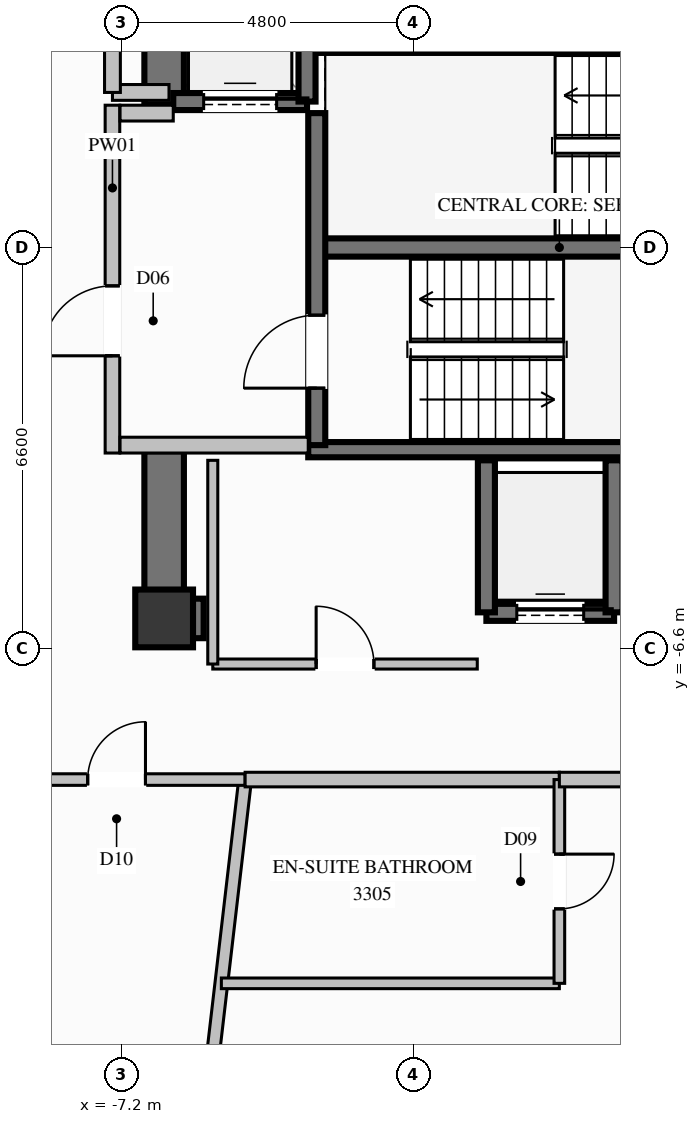
"""IFC4 building model, lengths in metres.
Left out: names, types, materials, properties, quantities, classifications, styles, units other than length and angle.
Written with IfcOpenShell. Run it as: python <this file> out.ifc"""

import sys

from ifc_helpers import new_model, si_unit, direction, frame, frame_2d, origin, origin_2d, place, context, subcontext, project, spatial, rectangle, extrude, element, fill, save


model = new_model("IFC4")
c1 = context("Model", 3, precision=1e-05, world=origin(), true_north=direction((0.0, 1.0)))
c2 = subcontext(c1, "Body", "Model", "MODEL_VIEW")
j1 = project(units=[si_unit("LENGTHUNIT", "METRE"), si_unit("PLANEANGLEUNIT", "RADIAN")], contexts=[c1])
p1 = place(None, origin())
s1 = spatial("IfcSite", under=j1, at=p1, CompositionType="ELEMENT")
p2 = place(p1, origin())
s2 = spatial("IfcBuilding", under=s1, at=p2, CompositionType="ELEMENT")
p3 = place(p2, frame((0.0, 0.0, 124.2)))
s3 = spatial("IfcBuildingStorey", under=s2, at=p3, CompositionType="ELEMENT", Elevation=124.2)
p4 = place(p3, frame((-6.5, -6.1, 0.0), z_axis=(0.0, 0.0, 1.0), x_axis=(1.0, 0.0, 0.0)))
e1 = element("IfcColumn", 1, at=p4, inside=s3, PredefinedType="COLUMN", context=c2, shape_type="SweptSolid", body=[
    extrude(rectangle(XDim=0.95, YDim=0.95, at=origin_2d()), origin(), (0.0, 0.0, 1.0), 3.6),
])
p5 = place(p3, frame((-3.99, 0.0, 0.0), z_axis=(0.0, 0.0, 1.0), x_axis=(1.0, 0.0, 0.0)))
e2 = element("IfcWall", 2, at=p5, inside=s3, PredefinedType="SHEAR", context=c2, shape_type="SweptSolid", body=[
    extrude(rectangle(XDim=7.98, YDim=0.3, at=frame_2d((3.99, 0.0))), origin(), (0.0, 0.0, 1.0), 3.6),
])
for number, where, z_axis, x_axis in (
    (3, (-4.13, -3.325, 0.0), (0.0, 0.0, 1.0), (1.0, 0.0, 0.0)),
    (4, (-4.13, 3.325, 0.0), (0.0, 0.0, 1.0), (1.0, 0.0, 0.0)),
):
    element("IfcWall", number, at=place(p3, frame(where, z_axis=z_axis, x_axis=x_axis)), inside=s3, PredefinedType="SOLIDWALL", context=c2, shape_type="SweptSolid", body=[
        extrude(rectangle(XDim=8.26, YDim=0.25, at=frame_2d((4.13, 0.0))), origin(), (0.0, 0.0, 1.0), 3.6),
    ])
p6 = place(p3, frame((-6.175, -6.1, 0.0), z_axis=(0.0, 0.0, 1.0), x_axis=(1.0, 0.0, 0.0)))
e5 = element("IfcWall", 5, at=p6, inside=s3, PredefinedType="SHEAR", context=c2, shape_type="SweptSolid", body=[
    extrude(rectangle(XDim=0.325, YDim=0.65, at=frame_2d((0.163, 0.0))), origin(), (0.0, 0.0, 1.0), 3.6),
])
p7 = place(p3, frame((-6.5, 2.35, 0.0), z_axis=(0.0, 0.0, 1.0), x_axis=(0.0, 1.0, 0.0)))
e6 = element("IfcWall", 6, at=p7, inside=s3, PredefinedType="SHEAR", context=c2, shape_type="SweptSolid", body=[
    extrude(rectangle(XDim=4.075, YDim=0.65, at=frame_2d((2.038, 0.0))), origin(), (0.0, 0.0, 1.0), 3.6),
])
p8 = place(p3, frame((-6.5, -6.425, 0.0), z_axis=(0.0, 0.0, 1.0), x_axis=(0.0, 1.0, 0.0)))
e7 = element("IfcWall", 7, at=p8, inside=s3, PredefinedType="SHEAR", context=c2, shape_type="SweptSolid", body=[
    extrude(rectangle(XDim=3.075, YDim=0.65, at=frame_2d((1.538, 0.0))), origin(), (0.0, 0.0, 1.0), 3.6),
])
p9 = place(p3, frame((-1.2, -6.0, 0.0), z_axis=(0.0, 0.0, 1.0), x_axis=(1.0, 0.0, 0.0)))
e8 = element("IfcWall", 8, at=p9, inside=s3, PredefinedType="SOLIDWALL", context=c2, shape_type="SweptSolid", body=[
    extrude(rectangle(XDim=2.1, YDim=0.28, at=frame_2d((1.05, 0.0))), origin(), (0.0, 0.0, 1.0), 3.35),
])
p10 = place(p9, frame((0.5, 0.0, 0.0)))
e9 = element("IfcOpeningElement", 9, at=p10, cuts=e8, PredefinedType="OPENING", context=c2, shape_type="SweptSolid", body=[
    extrude(rectangle(XDim=1.1, YDim=2.2, at=frame_2d((0.55, 1.1))), frame((0.0, 0.15, 0.0), z_axis=(0.0, -1.0, 0.0), x_axis=(1.0, 0.0, 0.0)), (0.0, 0.0, 1.0), 0.3),
])
for number, where, z_axis, x_axis in (
    (10, (-1.2, -3.5, 0.0), (0.0, 0.0, 1.0), (0.0, -1.0, 0.0)),
    (11, (0.9, -6.0, 0.0), (0.0, 0.0, 1.0), (0.0, 1.0, 0.0)),
):
    element("IfcWall", number, at=place(p3, frame(where, z_axis=z_axis, x_axis=x_axis)), inside=s3, PredefinedType="SOLIDWALL", context=c2, shape_type="SweptSolid", body=[
        extrude(rectangle(XDim=2.5, YDim=0.28, at=frame_2d((1.25, 0.0))), origin(), (0.0, 0.0, 1.0), 3.35),
    ])
p11 = place(p3, frame((-6.35, 2.4, 0.0), z_axis=(0.0, 0.0, 1.0), x_axis=(1.0, 0.0, 0.0)))
e12 = element("IfcWall", 12, at=p11, inside=s3, PredefinedType="SOLIDWALL", context=c2, shape_type="SweptSolid", body=[
    extrude(rectangle(XDim=2.2, YDim=0.28, at=frame_2d((1.1, 0.0))), origin(), (0.0, 0.0, 1.0), 3.35),
])
p12 = place(p11, frame((0.5, 0.0, 0.0)))
e13 = element("IfcOpeningElement", 13, at=p12, cuts=e12, PredefinedType="OPENING", context=c2, shape_type="SweptSolid", body=[
    extrude(rectangle(XDim=1.2, YDim=2.2, at=frame_2d((0.6, 1.1))), frame((0.0, 0.15, 0.0), z_axis=(0.0, -1.0, 0.0), x_axis=(1.0, 0.0, 0.0)), (0.0, 0.0, 1.0), 0.3),
])
p13 = place(p3, frame((-4.15, 2.4, 0.0), z_axis=(0.0, 0.0, 1.0), x_axis=(0.0, 1.0, 0.0)))
e14 = element("IfcWall", 14, at=p13, inside=s3, PredefinedType="SOLIDWALL", context=c2, shape_type="SweptSolid", body=[
    extrude(rectangle(XDim=2.7, YDim=0.28, at=frame_2d((1.35, 0.0))), origin(), (0.0, 0.0, 1.0), 3.35),
])
p14 = place(p3, frame((-3.99, -3.25, 0.0), z_axis=(0.0, 0.0, 1.0), x_axis=(0.0, 1.0, 0.0)))
e15 = element("IfcWall", 15, at=p14, inside=s3, PredefinedType="SOLIDWALL", context=c2, shape_type="SweptSolid", body=[
    extrude(rectangle(XDim=5.46, YDim=0.28, at=frame_2d((2.73, 0.0))), origin(), (0.0, 0.0, 1.0), 3.35),
])
p15 = place(p14, frame((0.937, 0.0, 0.0)))
e16 = element("IfcOpeningElement", 16, at=p15, cuts=e15, PredefinedType="OPENING", context=c2, shape_type="SweptSolid", body=[
    extrude(rectangle(XDim=1.2, YDim=2.2, at=frame_2d((0.6, 1.1))), frame((0.0, 0.15, 0.0), z_axis=(0.0, -1.0, 0.0), x_axis=(1.0, 0.0, 0.0)), (0.0, 0.0, 1.0), 0.3),
])
p16 = place(p3, frame((-7.35, -3.38, 0.0), z_axis=(0.0, 0.0, 1.0), x_axis=(0.0, 1.0, 0.0)))
e17 = element("IfcWall", 17, at=p16, inside=s3, PredefinedType="PARTITIONING", context=c2, shape_type="SweptSolid", body=[
    extrude(rectangle(XDim=5.72, YDim=0.24, at=frame_2d((2.86, 0.0))), origin(), (0.0, 0.0, 1.0), 2.435),
])
p17 = place(p16, frame((1.599, 0.0, 0.0)))
e18 = element("IfcOpeningElement", 18, at=p17, cuts=e17, PredefinedType="OPENING", context=c2, shape_type="SweptSolid", body=[
    extrude(rectangle(XDim=1.15, YDim=2.2, at=frame_2d((0.575, 1.1))), frame((0.0, 0.13, 0.0), z_axis=(0.0, -1.0, 0.0), x_axis=(1.0, 0.0, 0.0)), (0.0, 0.0, 1.0), 0.26),
])
p18 = place(p3, frame((-7.225, -3.25, 0.0), z_axis=(0.0, 0.0, 1.0), x_axis=(1.0, 0.0, 0.0)))
e19 = element("IfcWall", 19, at=p18, inside=s3, PredefinedType="PARTITIONING", context=c2, shape_type="SweptSolid", body=[
    extrude(rectangle(XDim=3.095, YDim=0.26, at=frame_2d((1.548, 0.0))), origin(), (0.0, 0.0, 1.0), 3.35),
])
p19 = place(p3, frame((-7.225, 2.21, 0.0), z_axis=(0.0, 0.0, 1.0), x_axis=(1.0, 0.0, 0.0)))
e20 = element("IfcWall", 20, at=p19, inside=s3, PredefinedType="PARTITIONING", context=c2, shape_type="SweptSolid", body=[
    extrude(rectangle(XDim=0.875, YDim=0.26, at=frame_2d((0.438, 0.0))), origin(), (0.0, 0.0, 1.0), 3.35),
])
p20 = place(p3, frame((-7.35, 2.55, 0.0), z_axis=(0.0, 0.0, 1.0), x_axis=(1.0, 0.0, 0.0)))
e21 = element("IfcWall", 21, at=p20, inside=s3, PredefinedType="PARTITIONING", context=c2, shape_type="SweptSolid", body=[
    extrude(rectangle(XDim=0.93, YDim=0.26, at=frame_2d((0.465, 0.0))), origin(), (0.0, 0.0, 1.0), 3.35),
])
p21 = place(p3, frame((-7.35, 2.55, 0.0), z_axis=(0.0, 0.0, 1.0), x_axis=(0.0, 1.0, 0.0)))
e22 = element("IfcWall", 22, at=p21, inside=s3, PredefinedType="PARTITIONING", context=c2, shape_type="SweptSolid", body=[
    extrude(rectangle(XDim=2.4, YDim=0.26, at=frame_2d((1.2, 0.0))), origin(), (0.0, 0.0, 1.0), 2.435),
])
p22 = place(p21, frame((0.775, 0.0, 0.0)))
e23 = element("IfcOpeningElement", 23, at=p22, cuts=e22, PredefinedType="OPENING", context=c2, shape_type="SweptSolid", body=[
    extrude(rectangle(XDim=0.85, YDim=2.05, at=frame_2d((0.425, 1.025))), frame((0.0, 0.14, 0.0), z_axis=(0.0, -1.0, 0.0), x_axis=(1.0, 0.0, 0.0)), (0.0, 0.0, 1.0), 0.28),
])
p23 = place(p3, frame((-5.7, -6.85, 0.0), z_axis=(0.0, 0.0, 1.0), x_axis=(1.0, 0.0, 0.0)))
e24 = element("IfcWall", 24, at=p23, inside=s3, PredefinedType="PARTITIONING", context=c2, shape_type="SweptSolid", body=[
    extrude(rectangle(XDim=4.35, YDim=0.165, at=frame_2d((2.175, 0.0))), origin(), (0.0, 0.0, 1.0), 2.435),
])
p24 = place(p23, frame((1.7, 0.0, 0.0)))
e25 = element("IfcOpeningElement", 25, at=p24, cuts=e24, PredefinedType="OPENING", context=c2, shape_type="SweptSolid", body=[
    extrude(rectangle(XDim=0.95, YDim=2.1, at=frame_2d((0.475, 1.05))), frame((0.0, 0.093, 0.0), z_axis=(0.0, -1.0, 0.0), x_axis=(1.0, 0.0, 0.0)), (0.0, 0.0, 1.0), 0.185),
])
p25 = place(p3, frame((-5.7, -3.5, 0.0), z_axis=(0.0, 0.0, 1.0), x_axis=(0.0, -1.0, 0.0)))
e26 = element("IfcWall", 26, at=p25, inside=s3, PredefinedType="PARTITIONING", context=c2, shape_type="SweptSolid", body=[
    extrude(rectangle(XDim=3.35, YDim=0.165, at=frame_2d((1.675, 0.0))), origin(), (0.0, 0.0, 1.0), 2.435),
])
p26 = place(p3, frame((-5.168, -8.75, 0.0), z_axis=(0.0, 0.0, 1.0), x_axis=(-0.115960666687, -0.993253806326, 0.0)))
e27 = element("IfcWall", 27, at=p26, inside=s3, PredefinedType="PARTITIONING", context=c2, shape_type="SweptSolid", body=[
    extrude(rectangle(XDim=11.245, YDim=0.21, at=frame_2d((5.623, 0.0))), origin(), (0.0, 0.0, 1.0), 3.35),
])
p27 = place(p3, frame((-9.396, -8.75, 0.0), z_axis=(0.0, 0.0, 1.0), x_axis=(1.0, 0.0, 0.0)))
e28 = element("IfcWall", 28, at=p27, inside=s3, PredefinedType="PARTITIONING", context=c2, shape_type="SweptSolid", body=[
    extrude(rectangle(XDim=4.228, YDim=0.19, at=frame_2d((2.114, 0.0))), origin(), (0.0, 0.0, 1.0), 3.35),
])
p28 = place(p27, frame((1.639, 0.0, 0.0)))
e29 = element("IfcOpeningElement", 29, at=p28, cuts=e28, PredefinedType="OPENING", context=c2, shape_type="SweptSolid", body=[
    extrude(rectangle(XDim=0.95, YDim=2.1, at=frame_2d((0.475, 1.05))), frame((0.0, 0.105, 0.0), z_axis=(0.0, -1.0, 0.0), x_axis=(1.0, 0.0, 0.0)), (0.0, 0.0, 1.0), 0.21),
])
p29 = place(p3, frame((-5.168, -8.75, 0.0), z_axis=(0.0, 0.0, 1.0), x_axis=(1.0, 0.0, 0.0)))
e30 = element("IfcWall", 30, at=p29, inside=s3, PredefinedType="PARTITIONING", context=c2, shape_type="SweptSolid", body=[
    extrude(rectangle(XDim=5.168, YDim=0.24, at=frame_2d((2.584, 0.0))), origin(), (0.0, 0.0, 1.0), 3.35),
])
p30 = place(p3, frame((-5.559, -12.101, 0.0), z_axis=(0.0, 0.0, 1.0), x_axis=(1.0, 0.0, 0.0)))
e31 = element("IfcWall", 31, at=p30, inside=s3, PredefinedType="PLUMBINGWALL", context=c2, shape_type="SweptSolid", body=[
    extrude(rectangle(XDim=5.559, YDim=0.175, at=frame_2d((2.78, 0.0))), origin(), (0.0, 0.0, 1.0), 2.985),
])
p31 = place(p3, frame((0.0, -8.75, 0.0), z_axis=(0.0, 0.0, 1.0), x_axis=(0.0, -1.0, 0.0)))
e32 = element("IfcWall", 32, at=p31, inside=s3, PredefinedType="PLUMBINGWALL", context=c2, shape_type="SweptSolid", body=[
    extrude(rectangle(XDim=3.351, YDim=0.175, at=frame_2d((1.676, 0.0))), origin(), (0.0, 0.0, 1.0), 3.35),
])
p32 = place(p31, frame((1.226, 0.0, 0.0)))
e33 = element("IfcOpeningElement", 33, at=p32, cuts=e32, PredefinedType="OPENING", context=c2, shape_type="SweptSolid", body=[
    extrude(rectangle(XDim=0.9, YDim=2.1, at=frame_2d((0.45, 1.05))), frame((0.0, 0.098, 0.0), z_axis=(0.0, -1.0, 0.0), x_axis=(1.0, 0.0, 0.0)), (0.0, 0.0, 1.0), 0.195),
])
p33 = place(p3, frame((0.0, -8.75, 0.0), z_axis=(0.0, 0.0, 1.0), x_axis=(1.0, 0.0, 0.0)))
e34 = element("IfcWall", 34, at=p33, inside=s3, PredefinedType="PARTITIONING", context=c2, shape_type="SweptSolid", body=[
    extrude(rectangle(XDim=5.168, YDim=0.24, at=frame_2d((2.584, 0.0))), origin(), (0.0, 0.0, 1.0), 3.35),
])
p34 = place(p33, frame((2.084, 0.0, 0.0)))
e35 = element("IfcOpeningElement", 35, at=p34, cuts=e34, PredefinedType="OPENING", context=c2, shape_type="SweptSolid", body=[
    extrude(rectangle(XDim=1.0, YDim=2.2, at=frame_2d((0.5, 1.1))), frame((0.0, 0.13, 0.0), z_axis=(0.0, -1.0, 0.0), x_axis=(1.0, 0.0, 0.0)), (0.0, 0.0, 1.0), 0.26),
])
p35 = place(p10, origin())
e36 = element("IfcDoor", 36, at=p35, inside=s3, OperationType="SLIDING_TO_LEFT", PredefinedType="DOOR", context=c2, shape_type="SweptSolid", body=[
    extrude(rectangle(XDim=1.1, YDim=2.2, at=frame_2d((0.55, 1.1))), frame((0.0, 0.025, 0.0), z_axis=(0.0, -1.0, 0.0), x_axis=(1.0, 0.0, 0.0)), (0.0, 0.0, 1.0), 0.05),
])
fill(e9, e36)
p36 = place(p12, origin())
e37 = element("IfcDoor", 37, at=p36, inside=s3, OperationType="SLIDING_TO_LEFT", PredefinedType="DOOR", context=c2, shape_type="SweptSolid", body=[
    extrude(rectangle(XDim=1.2, YDim=2.2, at=frame_2d((0.6, 1.1))), frame((0.0, 0.025, 0.0), z_axis=(0.0, -1.0, 0.0), x_axis=(1.0, 0.0, 0.0)), (0.0, 0.0, 1.0), 0.05),
])
fill(e13, e37)
p37 = place(p15, origin())
e38 = element("IfcDoor", 38, at=p37, inside=s3, OperationType="SINGLE_SWING_LEFT", PredefinedType="DOOR", context=c2, shape_type="SweptSolid", body=[
    extrude(rectangle(XDim=1.2, YDim=2.2, at=frame_2d((0.6, 1.1))), frame((0.0, 0.025, 0.0), z_axis=(0.0, -1.0, 0.0), x_axis=(1.0, 0.0, 0.0)), (0.0, 0.0, 1.0), 0.05),
])
fill(e16, e38)
p38 = place(p17, origin())
e39 = element("IfcDoor", 39, at=p38, inside=s3, OperationType="SINGLE_SWING_LEFT", PredefinedType="DOOR", context=c2, shape_type="SweptSolid", body=[
    extrude(rectangle(XDim=1.15, YDim=2.2, at=frame_2d((0.575, 1.1))), frame((0.0, 0.025, 0.0), z_axis=(0.0, -1.0, 0.0), x_axis=(1.0, 0.0, 0.0)), (0.0, 0.0, 1.0), 0.05),
])
fill(e18, e39)
p39 = place(p24, origin())
e40 = element("IfcDoor", 40, at=p39, inside=s3, OperationType="SINGLE_SWING_LEFT", PredefinedType="DOOR", context=c2, shape_type="SweptSolid", body=[
    extrude(rectangle(XDim=0.95, YDim=2.1, at=frame_2d((0.475, 1.05))), frame((0.0, 0.025, 0.0), z_axis=(0.0, -1.0, 0.0), x_axis=(1.0, 0.0, 0.0)), (0.0, 0.0, 1.0), 0.05),
])
fill(e25, e40)
p40 = place(p28, origin())
e41 = element("IfcDoor", 41, at=p40, inside=s3, OperationType="SINGLE_SWING_RIGHT", PredefinedType="DOOR", context=c2, shape_type="SweptSolid", body=[
    extrude(rectangle(XDim=0.95, YDim=2.1, at=frame_2d((0.475, 1.05))), frame((0.0, 0.025, 0.0), z_axis=(0.0, -1.0, 0.0), x_axis=(1.0, 0.0, 0.0)), (0.0, 0.0, 1.0), 0.05),
])
fill(e29, e41)
p41 = place(p32, origin())
e42 = element("IfcDoor", 42, at=p41, inside=s3, OperationType="SINGLE_SWING_LEFT", PredefinedType="DOOR", context=c2, shape_type="SweptSolid", body=[
    extrude(rectangle(XDim=0.9, YDim=2.1, at=frame_2d((0.45, 1.05))), frame((0.0, 0.025, 0.0), z_axis=(0.0, -1.0, 0.0), x_axis=(1.0, 0.0, 0.0)), (0.0, 0.0, 1.0), 0.05),
])
fill(e33, e42)
save(model, sys.argv[1])
